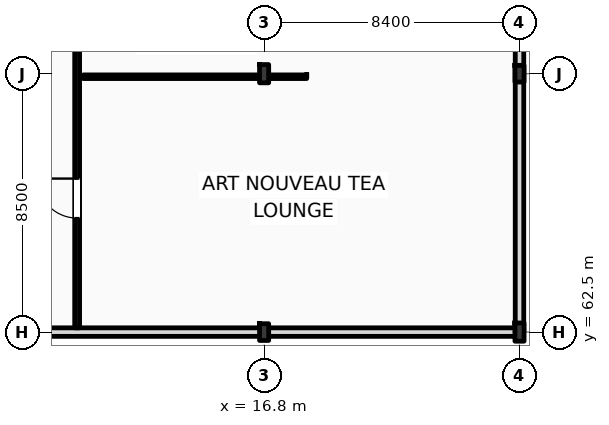
"""IFC4 building model, lengths in metres.
Left out: names, types, materials, properties, quantities, classifications, styles, units other than length and angle.
Written with IfcOpenShell. Run it as: python <this file> out.ifc"""

import sys

from ifc_helpers import new_model, si_unit, direction, frame, frame_2d, origin, origin_2d, place, context, subcontext, project, spatial, rectangle, i_section, extrude, element, fill, save


model = new_model("IFC4")
c1 = context("Model", 3, precision=1e-05, world=origin(), true_north=direction((0.0, 1.0)))
c2 = subcontext(c1, "Body", "Model", "MODEL_VIEW")
j1 = project(units=[si_unit("LENGTHUNIT", "METRE"), si_unit("PLANEANGLEUNIT", "RADIAN")], contexts=[c1])
p1 = place(None, origin())
s1 = spatial("IfcSite", under=j1, at=p1, CompositionType="ELEMENT")
p2 = place(p1, origin())
s2 = spatial("IfcBuilding", under=s1, at=p2, CompositionType="ELEMENT")
p3 = place(p2, frame((0.0, 0.0, 20.4)))
s3 = spatial("IfcBuildingStorey", under=s2, at=p3, CompositionType="ELEMENT", Elevation=20.4)
p4 = place(p3, frame((16.8, 62.5, 0.0), z_axis=(0.0, 0.0, 1.0), x_axis=(1.0, 0.0, 0.0)))
e1 = element("IfcColumn", 1, at=p4, inside=s3, PredefinedType="COLUMN", context=c2, shape_type="SweptSolid", body=[
    extrude(i_section(OverallWidth=0.3, OverallDepth=0.55, WebThickness=0.015, FlangeThickness=0.029, FilletRadius=0.027, at=origin_2d()), origin(), (0.0, 0.0, 1.0), 4.2),
])
for number, where, z_axis, x_axis in (
    (2, (16.8, 71.0, 0.0), (0.0, 0.0, 1.0), (1.0, 0.0, 0.0)),
    (3, (25.2, 62.5, 0.0), (0.0, 0.0, 1.0), (1.0, 0.0, 0.0)),
):
    element("IfcColumn", number, at=place(p3, frame(where, z_axis=z_axis, x_axis=x_axis)), inside=s3, PredefinedType="COLUMN", context=c2, shape_type="SweptSolid", body=[
        extrude(i_section(OverallWidth=0.3, OverallDepth=0.6, WebThickness=0.015, FlangeThickness=0.03, FilletRadius=0.027, at=origin_2d()), origin(), (0.0, 0.0, 1.0), 4.2),
    ])
p5 = place(p3, frame((25.2, 71.0, 0.0), z_axis=(0.0, 0.0, 1.0), x_axis=(1.0, 0.0, 0.0)))
e4 = element("IfcColumn", 4, at=p5, inside=s3, PredefinedType="COLUMN", context=c2, shape_type="SweptSolid", body=[
    extrude(i_section(OverallWidth=0.3, OverallDepth=0.55, WebThickness=0.015, FlangeThickness=0.029, FilletRadius=0.027, at=origin_2d()), origin(), (0.0, 0.0, 1.0), 4.2),
])
p6 = place(p3, frame((0.0, 62.5, 0.0), z_axis=(0.0, 0.0, 1.0), x_axis=(1.0, 0.0, 0.0)))
e5 = element("IfcWall", 5, at=p6, inside=s3, PredefinedType="STANDARD", context=c2, shape_type="SweptSolid", body=[
    extrude(rectangle(XDim=25.2, YDim=0.28, at=frame_2d((12.6, 0.0))), origin(), (0.0, 0.0, 1.0), 3.38),
])
p7 = place(p3, frame((25.2, 62.5, 0.0), z_axis=(0.0, 0.0, 1.0), x_axis=(0.0, 1.0, 0.0)))
e6 = element("IfcWall", 6, at=p7, inside=s3, PredefinedType="STANDARD", context=c2, shape_type="SweptSolid", body=[
    extrude(rectangle(XDim=17.0, YDim=0.28, at=frame_2d((8.5, 0.0))), origin(), (0.0, 0.0, 1.0), 3.53),
])
p8 = place(p3, frame((10.65, 62.64, 0.0), z_axis=(0.0, 0.0, 1.0), x_axis=(0.0, 1.0, 0.0)))
e7 = element("IfcWall", 7, at=p8, inside=s3, PredefinedType="PARTITIONING", context=c2, shape_type="SweptSolid", body=[
    extrude(rectangle(XDim=16.31, YDim=0.16, at=frame_2d((8.155, 0.0))), origin(), (0.0, 0.0, 1.0), 3.94),
])
p9 = place(p8, frame((3.61, 0.0, 0.0)))
e8 = element("IfcOpeningElement", 8, at=p9, cuts=e7, PredefinedType="OPENING", context=c2, shape_type="SweptSolid", body=[
    extrude(rectangle(XDim=1.3, YDim=2.2, at=frame_2d((0.65, 1.1))), frame((0.0, 0.09, 0.0), z_axis=(0.0, -1.0, 0.0), x_axis=(1.0, 0.0, 0.0)), (0.0, 0.0, 1.0), 0.18),
])
p10 = place(p8, frame((9.735, 0.0, 0.0)))
e9 = element("IfcOpeningElement", 9, at=p10, cuts=e7, PredefinedType="OPENING", context=c2, shape_type="SweptSolid", body=[
    extrude(rectangle(XDim=1.05, YDim=2.12, at=frame_2d((0.525, 1.06))), frame((0.0, 0.09, 0.0), z_axis=(0.0, -1.0, 0.0), x_axis=(1.0, 0.0, 0.0)), (0.0, 0.0, 1.0), 0.18),
])
p11 = place(p8, frame((13.49, 0.0, 0.0)))
e10 = element("IfcOpeningElement", 10, at=p11, cuts=e7, PredefinedType="OPENING", context=c2, shape_type="SweptSolid", body=[
    extrude(rectangle(XDim=0.94, YDim=2.15, at=frame_2d((0.47, 1.075))), frame((0.0, 0.09, 0.0), z_axis=(0.0, -1.0, 0.0), x_axis=(1.0, 0.0, 0.0)), (0.0, 0.0, 1.0), 0.18),
])
p12 = place(p3, frame((10.85, 70.9, 0.0), z_axis=(0.0, 0.0, 1.0), x_axis=(1.0, 0.0, 0.0)))
e11 = element("IfcWall", 11, at=p12, inside=s3, PredefinedType="PARTITIONING", context=c2, shape_type="SweptSolid", body=[
    extrude(rectangle(XDim=7.35, YDim=0.12, at=frame_2d((3.675, 0.0))), origin(), (0.0, 0.0, 1.0), 3.38),
])
p13 = place(p9, origin())
e12 = element("IfcDoor", 12, at=p13, inside=s3, OperationType="SINGLE_SWING_RIGHT", PredefinedType="DOOR", context=c2, shape_type="SweptSolid", body=[
    extrude(rectangle(XDim=1.3, YDim=2.2, at=frame_2d((0.65, 1.1))), frame((0.0, 0.025, 0.0), z_axis=(0.0, -1.0, 0.0), x_axis=(1.0, 0.0, 0.0)), (0.0, 0.0, 1.0), 0.05),
])
fill(e8, e12)
save(model, sys.argv[1])
